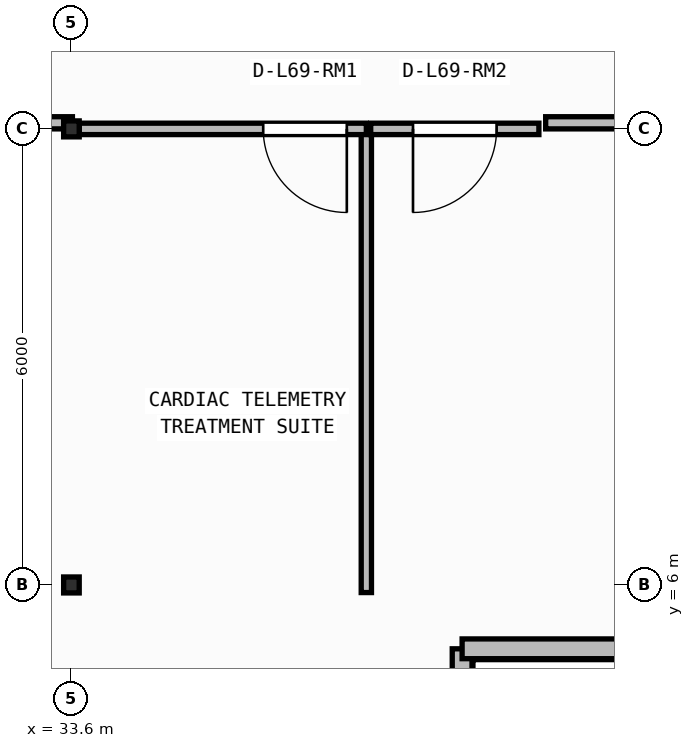
"""IFC4 building model, lengths in metres.
Left out: names, types, materials, properties, quantities, classifications, styles, units other than length and angle.
Written with IfcOpenShell. Run it as: python <this file> out.ifc"""

import sys

from ifc_helpers import new_model, si_unit, direction, frame, frame_2d, origin, origin_2d, place, context, subcontext, project, spatial, rectangle, i_section, extrude, element, fill, save


model = new_model("IFC4")
c1 = context("Model", 3, precision=1e-05, world=origin(), true_north=direction((0.0, 1.0)))
c2 = subcontext(c1, "Body", "Model", "MODEL_VIEW")
j1 = project(units=[si_unit("LENGTHUNIT", "METRE"), si_unit("PLANEANGLEUNIT", "RADIAN")], contexts=[c1])
p1 = place(None, origin())
s1 = spatial("IfcSite", under=j1, at=p1, CompositionType="ELEMENT")
p2 = place(p1, origin())
s2 = spatial("IfcBuilding", under=s1, at=p2, CompositionType="ELEMENT")
p3 = place(p2, frame((0.0, 0.0, 280.25)))
s3 = spatial("IfcBuildingStorey", under=s2, at=p3, CompositionType="ELEMENT", Elevation=280.25)
for number, where, z_axis, x_axis in (
    (1, (33.6, 6.0, 0.0), (0.0, 0.0, 1.0), (1.0, 0.0, 0.0)),
    (2, (33.6, 12.0, 0.0), (0.0, 0.0, 1.0), (1.0, 0.0, 0.0)),
):
    element("IfcColumn", number, at=place(p3, frame(where, z_axis=z_axis, x_axis=x_axis)), inside=s3, PredefinedType="COLUMN", context=c2, shape_type="SweptSolid", body=[
        extrude(i_section(OverallWidth=0.205, OverallDepth=0.21, WebThickness=0.009, FlangeThickness=0.014, FilletRadius=0.011, at=origin_2d()), origin(), (0.0, 0.0, 1.0), 3.95),
    ])
p4 = place(p3, frame((38.74, 2.849, 0.0), z_axis=(0.0, 0.0, 1.0), x_axis=(0.0, 1.0, 0.0)))
e3 = element("IfcWall", 3, at=p4, inside=s3, PredefinedType="STANDARD", context=c2, shape_type="SweptSolid", body=[
    extrude(rectangle(XDim=2.311, YDim=0.26, at=frame_2d((1.156, 0.0))), origin(), (0.0, 0.0, 1.0), 3.71),
])
p5 = place(p3, frame((38.74, 5.16, 0.0), z_axis=(0.0, 0.0, 1.0), x_axis=(1.0, 0.0, 0.0)))
e4 = element("IfcWall", 4, at=p5, inside=s3, PredefinedType="STANDARD", context=c2, shape_type="SweptSolid", body=[
    extrude(rectangle(XDim=2.3, YDim=0.26, at=frame_2d((1.15, 0.0))), origin(), (0.0, 0.0, 1.0), 3.71),
])
p6 = place(p3, frame((37.48, 5.9, 0.0), z_axis=(0.0, 0.0, 1.0), x_axis=(0.0, 1.0, 0.0)))
e5 = element("IfcWall", 5, at=p6, inside=s3, PredefinedType="PARTITIONING", context=c2, shape_type="SweptSolid", body=[
    extrude(rectangle(XDim=6.1, YDim=0.135, at=frame_2d((3.05, 0.0))), origin(), (0.0, 0.0, 1.0), 3.71),
])
p7 = place(p3, frame((37.48, 12.0, 0.0), z_axis=(0.0, 0.0, 1.0), x_axis=(-1.0, 0.0, 0.0)))
e6 = element("IfcWall", 6, at=p7, inside=s3, PredefinedType="PARTITIONING", context=c2, shape_type="SweptSolid", body=[
    extrude(rectangle(XDim=3.778, YDim=0.15, at=frame_2d((1.889, 0.0))), origin(), (0.0, 0.0, 1.0), 3.71),
])
p8 = place(p7, frame((0.257, 0.0, 0.0)))
e7 = element("IfcOpeningElement", 7, at=p8, cuts=e6, PredefinedType="OPENING", context=c2, shape_type="SweptSolid", body=[
    extrude(rectangle(XDim=1.1, YDim=2.1, at=frame_2d((0.55, 1.05))), frame((0.0, 0.085, 0.0), z_axis=(0.0, -1.0, 0.0), x_axis=(1.0, 0.0, 0.0)), (0.0, 0.0, 1.0), 0.17),
])
p9 = place(p3, frame((39.75, 12.0, 0.0), z_axis=(0.0, 0.0, 1.0), x_axis=(-1.0, 0.0, 0.0)))
e8 = element("IfcWall", 8, at=p9, inside=s3, PredefinedType="PARTITIONING", context=c2, shape_type="SweptSolid", body=[
    extrude(rectangle(XDim=2.212, YDim=0.15, at=frame_2d((1.106, 0.0))), origin(), (0.0, 0.0, 1.0), 3.71),
])
p10 = place(p9, frame((0.556, 0.0, 0.0)))
e9 = element("IfcOpeningElement", 9, at=p10, cuts=e8, PredefinedType="OPENING", context=c2, shape_type="SweptSolid", body=[
    extrude(rectangle(XDim=1.1, YDim=2.1, at=frame_2d((0.55, 1.05))), frame((0.0, 0.085, 0.0), z_axis=(0.0, -1.0, 0.0), x_axis=(1.0, 0.0, 0.0)), (0.0, 0.0, 1.0), 0.17),
])
p11 = place(p3, frame((31.439, 12.08, 0.0), z_axis=(0.0, 0.0, 1.0), x_axis=(1.0, 0.0, 0.0)))
e10 = element("IfcWall", 10, at=p11, inside=s3, PredefinedType="PARTITIONING", context=c2, shape_type="SweptSolid", body=[
    extrude(rectangle(XDim=2.174, YDim=0.16, at=frame_2d((1.087, 0.0))), origin(), (0.0, 0.0, 1.0), 3.157),
])
p12 = place(p3, frame((39.839, 12.08, 0.0), z_axis=(0.0, 0.0, 1.0), x_axis=(1.0, 0.0, 0.0)))
e11 = element("IfcWall", 11, at=p12, inside=s3, PredefinedType="PARTITIONING", context=c2, shape_type="SweptSolid", body=[
    extrude(rectangle(XDim=1.061, YDim=0.16, at=frame_2d((0.53, 0.0))), origin(), (0.0, 0.0, 1.0), 3.71),
])
p13 = place(p8, origin())
e12 = element("IfcDoor", 12, at=p13, inside=s3, OperationType="SINGLE_SWING_LEFT", PredefinedType="DOOR", context=c2, shape_type="SweptSolid", body=[
    extrude(rectangle(XDim=1.1, YDim=2.1, at=frame_2d((0.55, 1.05))), frame((0.0, 0.025, 0.0), z_axis=(0.0, -1.0, 0.0), x_axis=(1.0, 0.0, 0.0)), (0.0, 0.0, 1.0), 0.05),
])
fill(e7, e12)
p14 = place(p10, origin())
e13 = element("IfcDoor", 13, at=p14, inside=s3, OperationType="SINGLE_SWING_RIGHT", PredefinedType="DOOR", context=c2, shape_type="SweptSolid", body=[
    extrude(rectangle(XDim=1.1, YDim=2.1, at=frame_2d((0.55, 1.05))), frame((0.0, 0.025, 0.0), z_axis=(0.0, -1.0, 0.0), x_axis=(1.0, 0.0, 0.0)), (0.0, 0.0, 1.0), 0.05),
])
fill(e9, e13)
save(model, sys.argv[1])
